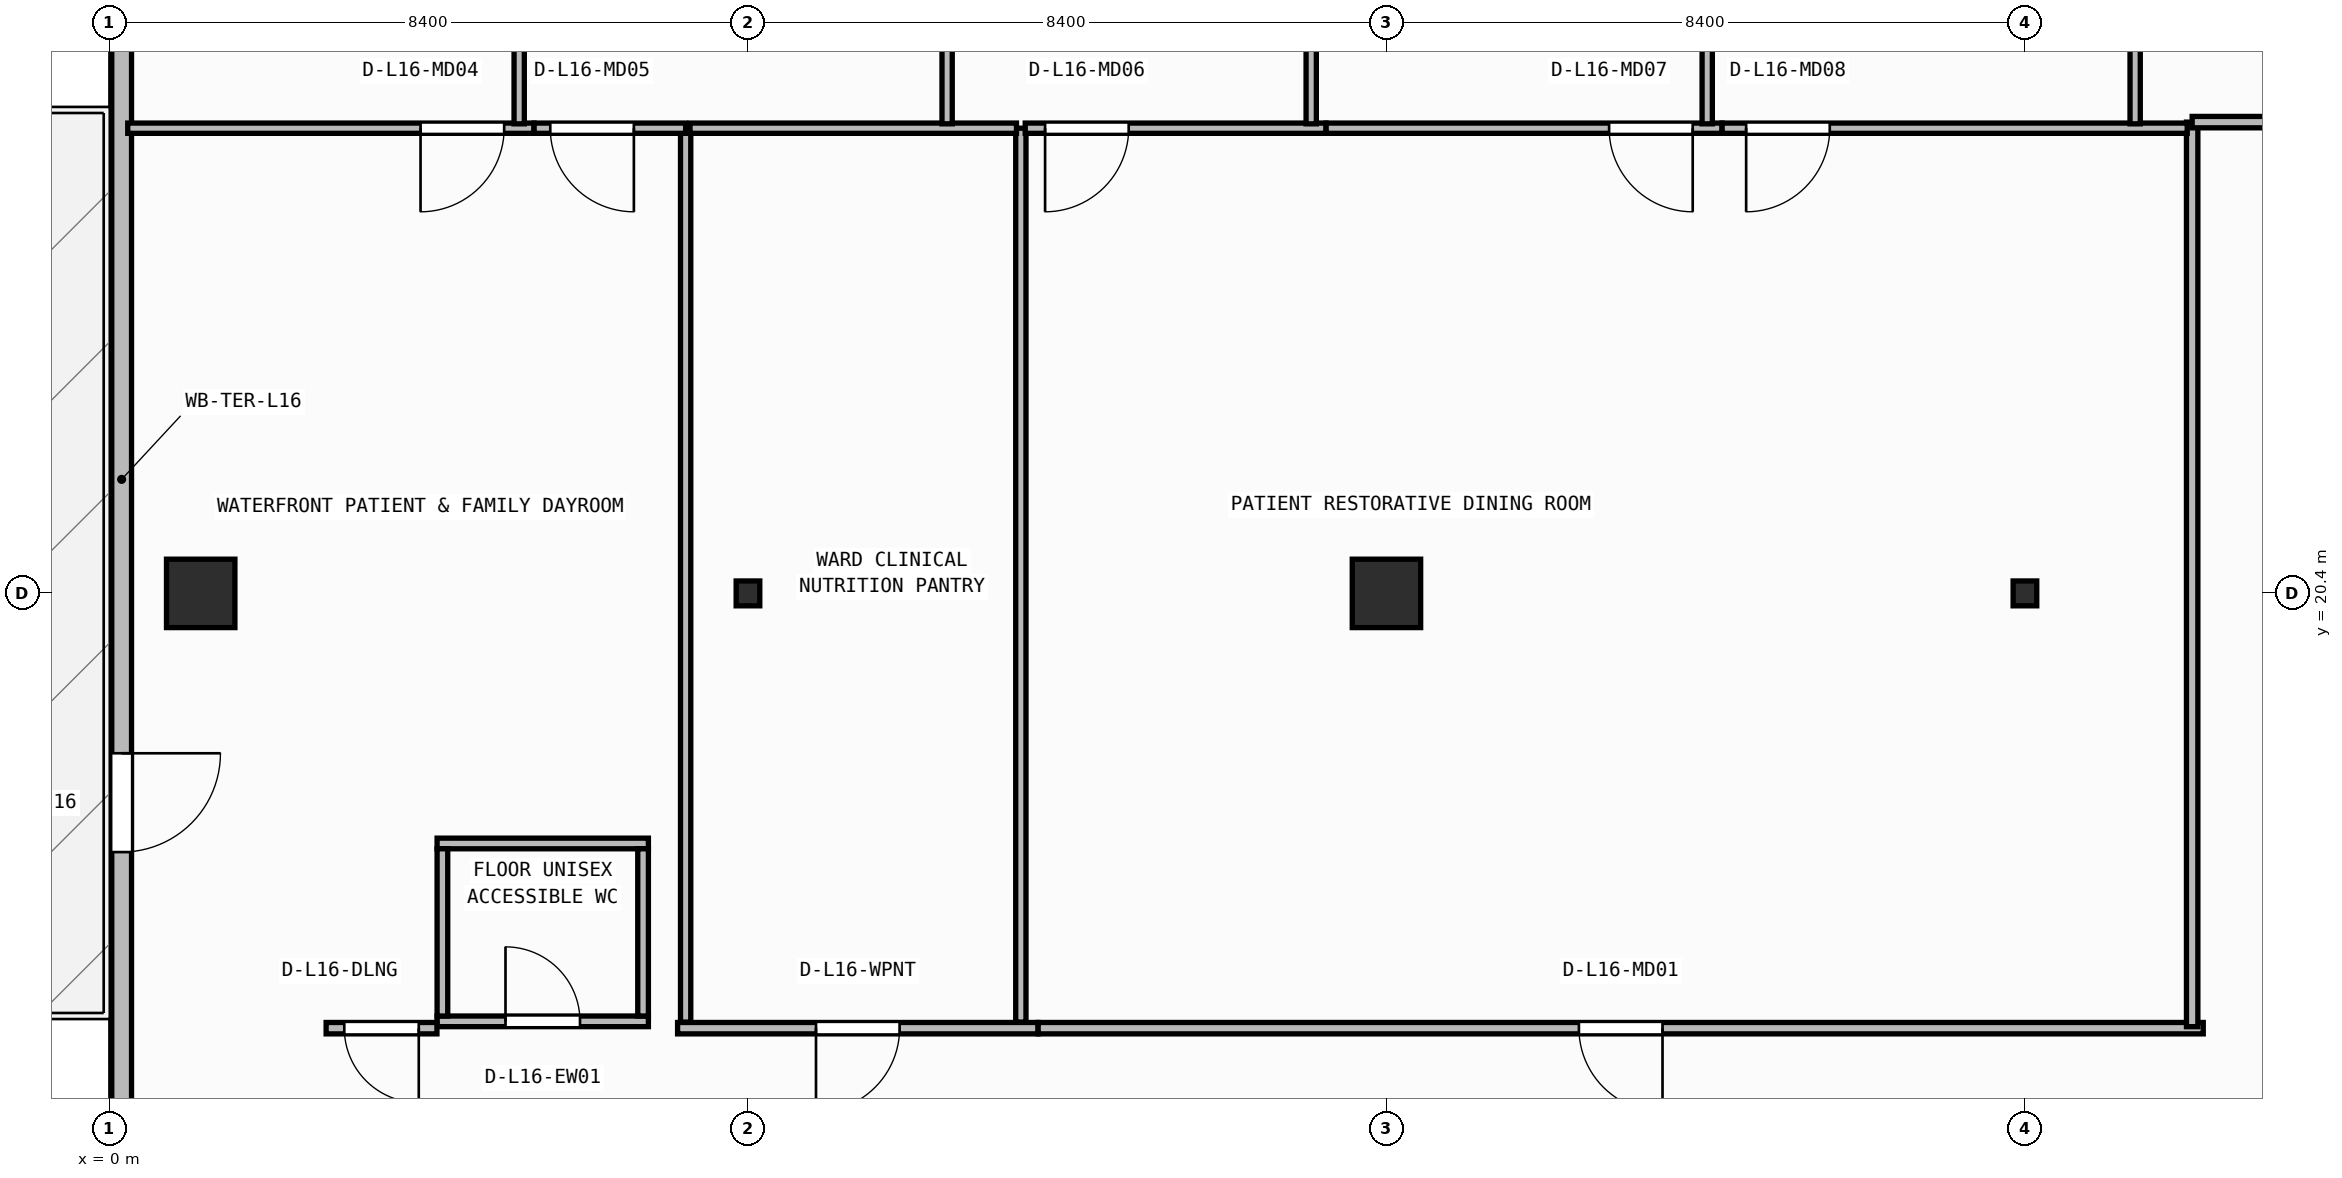
"""IFC4 building model, lengths in metres.
Left out: names, types, materials, properties, quantities, classifications, styles, units other than length and angle.
Written with IfcOpenShell. Run it as: python <this file> out.ifc"""

import sys

from ifc_helpers import new_model, si_unit, direction, frame, frame_2d, origin, origin_2d, place, context, subcontext, project, spatial, rectangle, i_section, extrude, element, fill, save


model = new_model("IFC4")
c1 = context("Model", 3, precision=1e-05, world=origin(), true_north=direction((0.0, 1.0)))
c2 = subcontext(c1, "Body", "Model", "MODEL_VIEW")
j1 = project(units=[si_unit("LENGTHUNIT", "METRE"), si_unit("PLANEANGLEUNIT", "RADIAN")], contexts=[c1])
p1 = place(None, origin())
s1 = spatial("IfcSite", under=j1, at=p1, CompositionType="ELEMENT")
p2 = place(p1, origin())
s2 = spatial("IfcBuilding", under=s1, at=p2, CompositionType="ELEMENT")
p3 = place(p2, frame((0.0, 0.0, 65.95)))
s3 = spatial("IfcBuildingStorey", under=s2, at=p3, CompositionType="ELEMENT", Elevation=65.95)
p4 = place(p3, frame((1.2, 20.4, 0.0), z_axis=(0.0, 0.0, 1.0), x_axis=(1.0, 0.0, 0.0)))
e1 = element("IfcColumn", 1, at=p4, inside=s3, PredefinedType="COLUMN", context=c2, shape_type="SweptSolid", body=[
    extrude(rectangle(XDim=0.9, YDim=0.9, at=origin_2d()), origin(), (0.0, 0.0, 1.0), 3.95),
])
p5 = place(p3, frame((8.4, 20.4, 0.0), z_axis=(0.0, 0.0, 1.0), x_axis=(1.0, 0.0, 0.0)))
e2 = element("IfcColumn", 2, at=p5, inside=s3, PredefinedType="COLUMN", context=c2, shape_type="SweptSolid", body=[
    extrude(i_section(OverallWidth=0.311, OverallDepth=0.327, WebThickness=0.016, FlangeThickness=0.025, FilletRadius=0.017, at=origin_2d()), origin(), (0.0, 0.0, 1.0), 3.95),
])
p6 = place(p3, frame((16.8, 20.4, 0.0), z_axis=(0.0, 0.0, 1.0), x_axis=(1.0, 0.0, 0.0)))
e3 = element("IfcColumn", 3, at=p6, inside=s3, PredefinedType="COLUMN", context=c2, shape_type="SweptSolid", body=[
    extrude(rectangle(XDim=0.9, YDim=0.9, at=origin_2d()), origin(), (0.0, 0.0, 1.0), 3.95),
])
p7 = place(p3, frame((25.2, 20.4, 0.0), z_axis=(0.0, 0.0, 1.0), x_axis=(1.0, 0.0, 0.0)))
e4 = element("IfcColumn", 4, at=p7, inside=s3, PredefinedType="COLUMN", context=c2, shape_type="SweptSolid", body=[
    extrude(i_section(OverallWidth=0.311, OverallDepth=0.327, WebThickness=0.016, FlangeThickness=0.025, FilletRadius=0.017, at=origin_2d()), origin(), (0.0, 0.0, 1.0), 3.95),
])
p8 = place(p3, frame((0.16, 41.04, 0.0), z_axis=(0.0, 0.0, 1.0), x_axis=(0.0, -1.0, 0.0)))
e5 = element("IfcWall", 5, at=p8, inside=s3, PredefinedType="STANDARD", context=c2, shape_type="SweptSolid", body=[
    extrude(rectangle(XDim=38.28, YDim=0.26, at=frame_2d((19.14, 0.0))), origin(), (0.0, 0.0, 1.0), 3.71),
])
p9 = place(p8, frame((22.743, 0.0, 0.0)))
e6 = element("IfcOpeningElement", 6, at=p9, cuts=e5, PredefinedType="OPENING", context=c2, shape_type="SweptSolid", body=[
    extrude(rectangle(XDim=1.3, YDim=2.15, at=frame_2d((0.65, 1.075))), frame((0.0, 0.14, 0.0), z_axis=(0.0, -1.0, 0.0), x_axis=(1.0, 0.0, 0.0)), (0.0, 0.0, 1.0), 0.28),
])
p10 = place(p3, frame((4.31, 14.77, 0.0), z_axis=(0.0, 0.0, 1.0), x_axis=(1.0, 0.0, 0.0)))
e7 = element("IfcWall", 7, at=p10, inside=s3, PredefinedType="PARTITIONING", context=c2, shape_type="SweptSolid", body=[
    extrude(rectangle(XDim=2.78, YDim=0.14, at=frame_2d((1.39, 0.0))), origin(), (0.0, 0.0, 1.0), 3.71),
])
p11 = place(p10, frame((0.9, 0.0, 0.0)))
e8 = element("IfcOpeningElement", 8, at=p11, cuts=e7, PredefinedType="OPENING", context=c2, shape_type="SweptSolid", body=[
    extrude(rectangle(XDim=0.98, YDim=2.1, at=frame_2d((0.49, 1.05))), frame((0.0, 0.08, 0.0), z_axis=(0.0, -1.0, 0.0), x_axis=(1.0, 0.0, 0.0)), (0.0, 0.0, 1.0), 0.16),
])
p12 = place(p3, frame((4.31, 17.11, 0.0), z_axis=(0.0, 0.0, 1.0), x_axis=(1.0, 0.0, 0.0)))
e9 = element("IfcWall", 9, at=p12, inside=s3, PredefinedType="PARTITIONING", context=c2, shape_type="SweptSolid", body=[
    extrude(rectangle(XDim=2.78, YDim=0.14, at=frame_2d((1.39, 0.0))), origin(), (0.0, 0.0, 1.0), 3.71),
])
for number, where, z_axis, x_axis in (
    (10, (4.38, 14.84, 0.0), (0.0, 0.0, 1.0), (0.0, 1.0, 0.0)),
    (11, (7.02, 14.84, 0.0), (0.0, 0.0, 1.0), (0.0, 1.0, 0.0)),
):
    element("IfcWall", number, at=place(p3, frame(where, z_axis=z_axis, x_axis=x_axis)), inside=s3, PredefinedType="PARTITIONING", context=c2, shape_type="SweptSolid", body=[
        extrude(rectangle(XDim=2.2, YDim=0.14, at=frame_2d((1.1, 0.0))), origin(), (0.0, 0.0, 1.0), 3.71),
    ])
p13 = place(p3, frame((4.308, 14.68, 0.0), z_axis=(0.0, 0.0, 1.0), x_axis=(-1.0, 0.0, 0.0)))
e12 = element("IfcWall", 12, at=p13, inside=s3, PredefinedType="PARTITIONING", context=c2, shape_type="SweptSolid", body=[
    extrude(rectangle(XDim=1.458, YDim=0.15, at=frame_2d((0.729, 0.0))), origin(), (0.0, 0.0, 1.0), 3.71),
])
p14 = place(p13, frame((0.239, 0.0, 0.0)))
e13 = element("IfcOpeningElement", 13, at=p14, cuts=e12, PredefinedType="OPENING", context=c2, shape_type="SweptSolid", body=[
    extrude(rectangle(XDim=0.98, YDim=2.1, at=frame_2d((0.49, 1.05))), frame((0.0, 0.085, 0.0), z_axis=(0.0, -1.0, 0.0), x_axis=(1.0, 0.0, 0.0)), (0.0, 0.0, 1.0), 0.17),
])
p15 = place(p3, frame((12.216, 14.68, 0.0), z_axis=(0.0, 0.0, 1.0), x_axis=(-1.0, 0.0, 0.0)))
e14 = element("IfcWall", 14, at=p15, inside=s3, PredefinedType="PARTITIONING", context=c2, shape_type="SweptSolid", body=[
    extrude(rectangle(XDim=4.742, YDim=0.15, at=frame_2d((2.371, 0.0))), origin(), (0.0, 0.0, 1.0), 3.71),
])
p16 = place(p15, frame((1.821, 0.0, 0.0)))
e15 = element("IfcOpeningElement", 15, at=p16, cuts=e14, PredefinedType="OPENING", context=c2, shape_type="SweptSolid", body=[
    extrude(rectangle(XDim=1.1, YDim=2.1, at=frame_2d((0.55, 1.05))), frame((0.0, 0.085, 0.0), z_axis=(0.0, -1.0, 0.0), x_axis=(1.0, 0.0, 0.0)), (0.0, 0.0, 1.0), 0.17),
])
p17 = place(p3, frame((27.546, 14.68, 0.0), z_axis=(0.0, 0.0, 1.0), x_axis=(-1.0, 0.0, 0.0)))
e16 = element("IfcWall", 16, at=p17, inside=s3, PredefinedType="PARTITIONING", context=c2, shape_type="SweptSolid", body=[
    extrude(rectangle(XDim=15.328, YDim=0.15, at=frame_2d((7.664, 0.0))), origin(), (0.0, 0.0, 1.0), 3.71),
])
p18 = place(p17, frame((7.114, 0.0, 0.0)))
e17 = element("IfcOpeningElement", 17, at=p18, cuts=e16, PredefinedType="OPENING", context=c2, shape_type="SweptSolid", body=[
    extrude(rectangle(XDim=1.1, YDim=2.1, at=frame_2d((0.55, 1.05))), frame((0.0, 0.085, 0.0), z_axis=(0.0, -1.0, 0.0), x_axis=(1.0, 0.0, 0.0)), (0.0, 0.0, 1.0), 0.17),
])
p19 = place(p3, frame((27.4, 26.6, 0.0), z_axis=(0.0, 0.0, 1.0), x_axis=(0.0, -1.0, 0.0)))
e18 = element("IfcWall", 18, at=p19, inside=s3, PredefinedType="PARTITIONING", context=c2, shape_type="SweptSolid", body=[
    extrude(rectangle(XDim=11.9, YDim=0.15, at=frame_2d((5.95, 0.0))), origin(), (0.0, 0.0, 1.0), 3.71),
])
p20 = place(p3, frame((29.9, 26.6, 0.0), z_axis=(0.0, 0.0, 1.0), x_axis=(-1.0, 0.0, 0.0)))
e19 = element("IfcWall", 19, at=p20, inside=s3, PredefinedType="PARTITIONING", context=c2, shape_type="SweptSolid", body=[
    extrude(rectangle(XDim=2.5, YDim=0.15, at=frame_2d((1.25, 0.0))), origin(), (0.0, 0.0, 1.0), 3.71),
])
p21 = place(p20, frame((0.225, 0.0, 0.0)))
e20 = element("IfcOpeningElement", 20, at=p21, cuts=e19, PredefinedType="OPENING", context=c2, shape_type="SweptSolid", body=[
    extrude(rectangle(XDim=1.1, YDim=2.1, at=frame_2d((0.55, 1.05))), frame((0.0, 0.085, 0.0), z_axis=(0.0, -1.0, 0.0), x_axis=(1.0, 0.0, 0.0)), (0.0, 0.0, 1.0), 0.17),
])
p22 = place(p3, frame((7.58, 14.76, 0.0), z_axis=(0.0, 0.0, 1.0), x_axis=(0.0, 1.0, 0.0)))
e21 = element("IfcWall", 21, at=p22, inside=s3, PredefinedType="PARTITIONING", context=c2, shape_type="SweptSolid", body=[
    extrude(rectangle(XDim=11.76, YDim=0.135, at=frame_2d((5.88, 0.0))), origin(), (0.0, 0.0, 1.0), 3.71),
])
p23 = place(p3, frame((5.585, 26.52, 0.0), z_axis=(0.0, 0.0, 1.0), x_axis=(-1.0, 0.0, 0.0)))
e22 = element("IfcWall", 22, at=p23, inside=s3, PredefinedType="PARTITIONING", context=c2, shape_type="SweptSolid", body=[
    extrude(rectangle(XDim=5.345, YDim=0.135, at=frame_2d((2.672, 0.0))), origin(), (0.0, 0.0, 1.0), 3.71),
])
p24 = place(p23, frame((0.392, 0.0, 0.0)))
e23 = element("IfcOpeningElement", 23, at=p24, cuts=e22, PredefinedType="OPENING", context=c2, shape_type="SweptSolid", body=[
    extrude(rectangle(XDim=1.1, YDim=2.1, at=frame_2d((0.55, 1.05))), frame((0.0, 0.077, 0.0), z_axis=(0.0, -1.0, 0.0), x_axis=(1.0, 0.0, 0.0)), (0.0, 0.0, 1.0), 0.155),
])
p25 = place(p3, frame((7.58, 26.52, 0.0), z_axis=(0.0, 0.0, 1.0), x_axis=(-1.0, 0.0, 0.0)))
e24 = element("IfcWall", 24, at=p25, inside=s3, PredefinedType="PARTITIONING", context=c2, shape_type="SweptSolid", body=[
    extrude(rectangle(XDim=1.993, YDim=0.135, at=frame_2d((0.997, 0.0))), origin(), (0.0, 0.0, 1.0), 3.71),
])
p26 = place(p25, frame((0.681, 0.0, 0.0)))
e25 = element("IfcOpeningElement", 25, at=p26, cuts=e24, PredefinedType="OPENING", context=c2, shape_type="SweptSolid", body=[
    extrude(rectangle(XDim=1.1, YDim=2.1, at=frame_2d((0.55, 1.05))), frame((0.0, 0.077, 0.0), z_axis=(0.0, -1.0, 0.0), x_axis=(1.0, 0.0, 0.0)), (0.0, 0.0, 1.0), 0.155),
])
p27 = place(p3, frame((11.99, 14.76, 0.0), z_axis=(0.0, 0.0, 1.0), x_axis=(0.0, 1.0, 0.0)))
e26 = element("IfcWall", 26, at=p27, inside=s3, PredefinedType="PARTITIONING", context=c2, shape_type="SweptSolid", body=[
    extrude(rectangle(XDim=11.76, YDim=0.135, at=frame_2d((5.88, 0.0))), origin(), (0.0, 0.0, 1.0), 3.71),
])
p28 = place(p3, frame((11.933, 26.52, 0.0), z_axis=(0.0, 0.0, 1.0), x_axis=(-1.0, 0.0, 0.0)))
e27 = element("IfcWall", 27, at=p28, inside=s3, PredefinedType="PARTITIONING", context=c2, shape_type="SweptSolid", body=[
    extrude(rectangle(XDim=4.295, YDim=0.135, at=frame_2d((2.147, 0.0))), origin(), (0.0, 0.0, 1.0), 3.71),
])
p29 = place(p3, frame((16.005, 26.52, 0.0), z_axis=(0.0, 0.0, 1.0), x_axis=(-1.0, 0.0, 0.0)))
e28 = element("IfcWall", 28, at=p29, inside=s3, PredefinedType="PARTITIONING", context=c2, shape_type="SweptSolid", body=[
    extrude(rectangle(XDim=3.957, YDim=0.135, at=frame_2d((1.979, 0.0))), origin(), (0.0, 0.0, 1.0), 3.71),
])
p30 = place(p29, frame((2.596, 0.0, 0.0)))
e29 = element("IfcOpeningElement", 29, at=p30, cuts=e28, PredefinedType="OPENING", context=c2, shape_type="SweptSolid", body=[
    extrude(rectangle(XDim=1.1, YDim=2.1, at=frame_2d((0.55, 1.05))), frame((0.0, 0.077, 0.0), z_axis=(0.0, -1.0, 0.0), x_axis=(1.0, 0.0, 0.0)), (0.0, 0.0, 1.0), 0.155),
])
p31 = place(p3, frame((21.215, 26.52, 0.0), z_axis=(0.0, 0.0, 1.0), x_axis=(-1.0, 0.0, 0.0)))
e30 = element("IfcWall", 30, at=p31, inside=s3, PredefinedType="PARTITIONING", context=c2, shape_type="SweptSolid", body=[
    extrude(rectangle(XDim=5.208, YDim=0.135, at=frame_2d((2.604, 0.0))), origin(), (0.0, 0.0, 1.0), 3.71),
])
p32 = place(p31, frame((0.385, 0.0, 0.0)))
e31 = element("IfcOpeningElement", 31, at=p32, cuts=e30, PredefinedType="OPENING", context=c2, shape_type="SweptSolid", body=[
    extrude(rectangle(XDim=1.1, YDim=2.1, at=frame_2d((0.55, 1.05))), frame((0.0, 0.077, 0.0), z_axis=(0.0, -1.0, 0.0), x_axis=(1.0, 0.0, 0.0)), (0.0, 0.0, 1.0), 0.155),
])
p33 = place(p3, frame((27.335, 26.52, 0.0), z_axis=(0.0, 0.0, 1.0), x_axis=(-1.0, 0.0, 0.0)))
e32 = element("IfcWall", 32, at=p33, inside=s3, PredefinedType="PARTITIONING", context=c2, shape_type="SweptSolid", body=[
    extrude(rectangle(XDim=6.118, YDim=0.135, at=frame_2d((3.059, 0.0))), origin(), (0.0, 0.0, 1.0), 3.71),
])
p34 = place(p33, frame((4.703, 0.0, 0.0)))
e33 = element("IfcOpeningElement", 33, at=p34, cuts=e32, PredefinedType="OPENING", context=c2, shape_type="SweptSolid", body=[
    extrude(rectangle(XDim=1.1, YDim=2.1, at=frame_2d((0.55, 1.05))), frame((0.0, 0.077, 0.0), z_axis=(0.0, -1.0, 0.0), x_axis=(1.0, 0.0, 0.0)), (0.0, 0.0, 1.0), 0.155),
])
p35 = place(p3, frame((5.39, 26.577, 0.0), z_axis=(0.0, 0.0, 1.0), x_axis=(0.0, 1.0, 0.0)))
e34 = element("IfcWall", 34, at=p35, inside=s3, PredefinedType="PARTITIONING", context=c2, shape_type="SweptSolid", body=[
    extrude(rectangle(XDim=15.133, YDim=0.135, at=frame_2d((7.566, 0.0))), origin(), (0.0, 0.0, 1.0), 3.71),
])
p36 = place(p3, frame((11.02, 26.577, 0.0), z_axis=(0.0, 0.0, 1.0), x_axis=(0.0, 1.0, 0.0)))
e35 = element("IfcWall", 35, at=p36, inside=s3, PredefinedType="PARTITIONING", context=c2, shape_type="SweptSolid", body=[
    extrude(rectangle(XDim=11.306, YDim=0.135, at=frame_2d((5.653, 0.0))), origin(), (0.0, 0.0, 1.0), 3.71),
])
p37 = place(p3, frame((15.81, 26.577, 0.0), z_axis=(0.0, 0.0, 1.0), x_axis=(0.0, 1.0, 0.0)))
e36 = element("IfcWall", 36, at=p37, inside=s3, PredefinedType="PARTITIONING", context=c2, shape_type="SweptSolid", body=[
    extrude(rectangle(XDim=8.947, YDim=0.135, at=frame_2d((4.473, 0.0))), origin(), (0.0, 0.0, 1.0), 3.71),
])
p38 = place(p3, frame((21.02, 26.577, 0.0), z_axis=(0.0, 0.0, 1.0), x_axis=(0.0, 1.0, 0.0)))
e37 = element("IfcWall", 37, at=p38, inside=s3, PredefinedType="PARTITIONING", context=c2, shape_type="SweptSolid", body=[
    extrude(rectangle(XDim=6.503, YDim=0.135, at=frame_2d((3.252, 0.0))), origin(), (0.0, 0.0, 1.0), 3.71),
])
p39 = place(p3, frame((26.65, 26.577, 0.0), z_axis=(0.0, 0.0, 1.0), x_axis=(0.0, 1.0, 0.0)))
e38 = element("IfcWall", 38, at=p39, inside=s3, PredefinedType="PARTITIONING", context=c2, shape_type="SweptSolid", body=[
    extrude(rectangle(XDim=4.893, YDim=0.135, at=frame_2d((2.447, 0.0))), origin(), (0.0, 0.0, 1.0), 3.71),
])
p40 = place(p9, origin())
e39 = element("IfcDoor", 39, at=p40, inside=s3, OperationType="SINGLE_SWING_LEFT", PredefinedType="DOOR", context=c2, shape_type="SweptSolid", body=[
    extrude(rectangle(XDim=1.3, YDim=2.15, at=frame_2d((0.65, 1.075))), frame((0.0, 0.025, 0.0), z_axis=(0.0, -1.0, 0.0), x_axis=(1.0, 0.0, 0.0)), (0.0, 0.0, 1.0), 0.05),
])
fill(e6, e39)
p41 = place(p11, origin())
e40 = element("IfcDoor", 40, at=p41, inside=s3, OperationType="SINGLE_SWING_LEFT", PredefinedType="DOOR", context=c2, shape_type="SweptSolid", body=[
    extrude(rectangle(XDim=0.98, YDim=2.1, at=frame_2d((0.49, 1.05))), frame((0.0, 0.025, 0.0), z_axis=(0.0, -1.0, 0.0), x_axis=(1.0, 0.0, 0.0)), (0.0, 0.0, 1.0), 0.05),
])
fill(e8, e40)
p42 = place(p14, origin())
e41 = element("IfcDoor", 41, at=p42, inside=s3, OperationType="SINGLE_SWING_LEFT", PredefinedType="DOOR", context=c2, shape_type="SweptSolid", body=[
    extrude(rectangle(XDim=0.98, YDim=2.1, at=frame_2d((0.49, 1.05))), frame((0.0, 0.025, 0.0), z_axis=(0.0, -1.0, 0.0), x_axis=(1.0, 0.0, 0.0)), (0.0, 0.0, 1.0), 0.05),
])
fill(e13, e41)
p43 = place(p16, origin())
e42 = element("IfcDoor", 42, at=p43, inside=s3, OperationType="SINGLE_SWING_RIGHT", PredefinedType="DOOR", context=c2, shape_type="SweptSolid", body=[
    extrude(rectangle(XDim=1.1, YDim=2.1, at=frame_2d((0.55, 1.05))), frame((0.0, 0.025, 0.0), z_axis=(0.0, -1.0, 0.0), x_axis=(1.0, 0.0, 0.0)), (0.0, 0.0, 1.0), 0.05),
])
fill(e15, e42)
p44 = place(p18, origin())
e43 = element("IfcDoor", 43, at=p44, inside=s3, OperationType="SINGLE_SWING_LEFT", PredefinedType="DOOR", context=c2, shape_type="SweptSolid", body=[
    extrude(rectangle(XDim=1.1, YDim=2.1, at=frame_2d((0.55, 1.05))), frame((0.0, 0.025, 0.0), z_axis=(0.0, -1.0, 0.0), x_axis=(1.0, 0.0, 0.0)), (0.0, 0.0, 1.0), 0.05),
])
fill(e17, e43)
p45 = place(p24, origin())
e44 = element("IfcDoor", 44, at=p45, inside=s3, OperationType="SINGLE_SWING_RIGHT", PredefinedType="DOOR", context=c2, shape_type="SweptSolid", body=[
    extrude(rectangle(XDim=1.1, YDim=2.1, at=frame_2d((0.55, 1.05))), frame((0.0, 0.025, 0.0), z_axis=(0.0, -1.0, 0.0), x_axis=(1.0, 0.0, 0.0)), (0.0, 0.0, 1.0), 0.05),
])
fill(e23, e44)
p46 = place(p26, origin())
e45 = element("IfcDoor", 45, at=p46, inside=s3, OperationType="SINGLE_SWING_LEFT", PredefinedType="DOOR", context=c2, shape_type="SweptSolid", body=[
    extrude(rectangle(XDim=1.1, YDim=2.1, at=frame_2d((0.55, 1.05))), frame((0.0, 0.025, 0.0), z_axis=(0.0, -1.0, 0.0), x_axis=(1.0, 0.0, 0.0)), (0.0, 0.0, 1.0), 0.05),
])
fill(e25, e45)
p47 = place(p30, origin())
e46 = element("IfcDoor", 46, at=p47, inside=s3, OperationType="SINGLE_SWING_RIGHT", PredefinedType="DOOR", context=c2, shape_type="SweptSolid", body=[
    extrude(rectangle(XDim=1.1, YDim=2.1, at=frame_2d((0.55, 1.05))), frame((0.0, 0.025, 0.0), z_axis=(0.0, -1.0, 0.0), x_axis=(1.0, 0.0, 0.0)), (0.0, 0.0, 1.0), 0.05),
])
fill(e29, e46)
p48 = place(p32, origin())
e47 = element("IfcDoor", 47, at=p48, inside=s3, OperationType="SINGLE_SWING_LEFT", PredefinedType="DOOR", context=c2, shape_type="SweptSolid", body=[
    extrude(rectangle(XDim=1.1, YDim=2.1, at=frame_2d((0.55, 1.05))), frame((0.0, 0.025, 0.0), z_axis=(0.0, -1.0, 0.0), x_axis=(1.0, 0.0, 0.0)), (0.0, 0.0, 1.0), 0.05),
])
fill(e31, e47)
p49 = place(p34, origin())
e48 = element("IfcDoor", 48, at=p49, inside=s3, OperationType="SINGLE_SWING_RIGHT", PredefinedType="DOOR", context=c2, shape_type="SweptSolid", body=[
    extrude(rectangle(XDim=1.1, YDim=2.1, at=frame_2d((0.55, 1.05))), frame((0.0, 0.025, 0.0), z_axis=(0.0, -1.0, 0.0), x_axis=(1.0, 0.0, 0.0)), (0.0, 0.0, 1.0), 0.05),
])
fill(e33, e48)
save(model, sys.argv[1])
